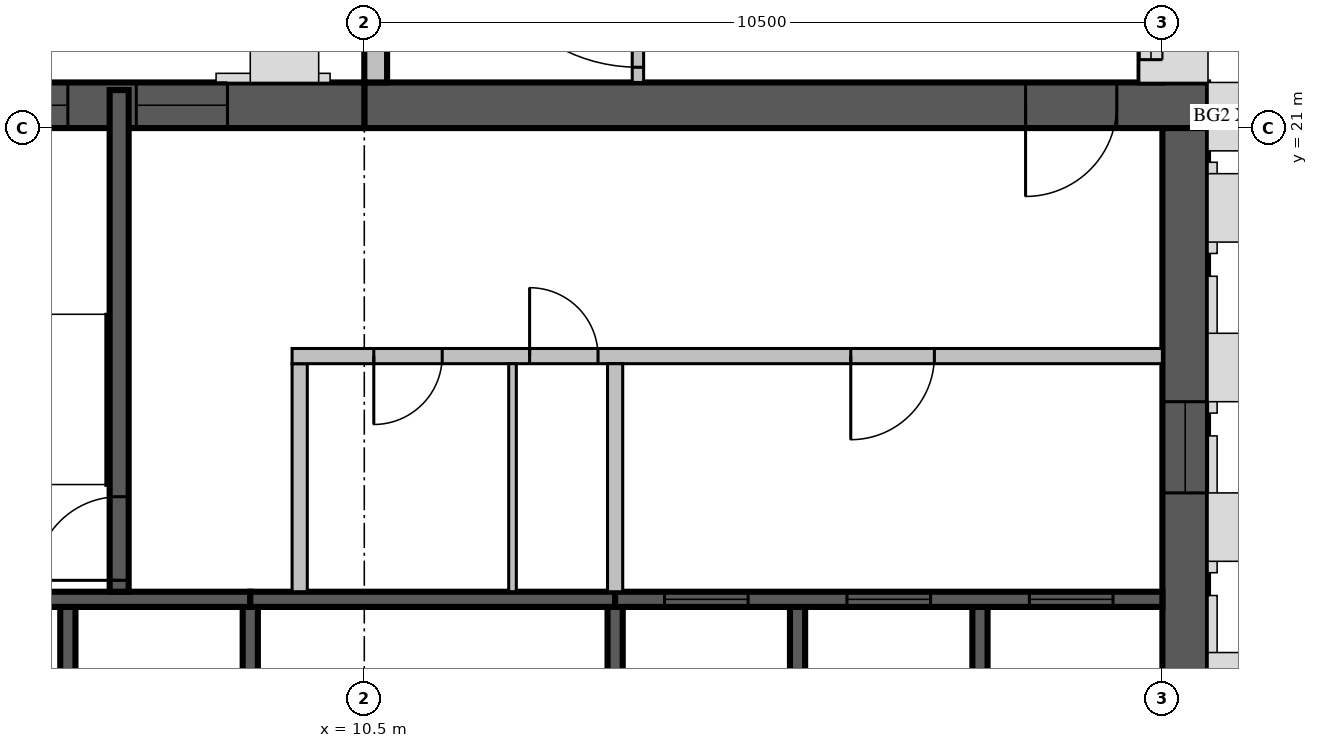
"""IFC4 building model, lengths in metres.
Left out: names, types, materials, properties, quantities, classifications, styles, units other than length and angle.
Written with IfcOpenShell. Run it as: python <this file> out.ifc"""

import sys

from ifc_helpers import new_model, si_unit, direction, frame, frame_2d, origin, place, context, subcontext, project, spatial, rectangle, extrude, source, transform, mapped, element, fill, save


model = new_model("IFC4")
c1 = context("Model", 3, precision=1e-05, world=origin(), true_north=direction((0.0, 1.0)))
c2 = subcontext(c1, "Body", "Model", "MODEL_VIEW")
j1 = project(units=[si_unit("LENGTHUNIT", "METRE"), si_unit("PLANEANGLEUNIT", "RADIAN")], contexts=[c1])
p1 = place(None, origin())
s1 = spatial("IfcSite", under=j1, at=p1, CompositionType="ELEMENT")
p2 = place(p1, origin())
s2 = spatial("IfcBuilding", under=s1, at=p2, CompositionType="ELEMENT")
p3 = place(p2, frame((0.0, 0.0, 326.5)))
s3 = spatial("IfcBuildingStorey", under=s2, at=p3, CompositionType="ELEMENT", Elevation=326.5)
m1 = source(origin(), c2, "Body", "SweptSolid", [
    extrude(rectangle(XDim=11.1, YDim=0.6, at=frame_2d((5.55, 0.0))), origin(), (0.0, 0.0, 1.0), 3.5),
])
p4 = place(p3, frame((10.5, 21.3, 0.0), z_axis=(0.0, 0.0, 1.0), x_axis=(1.0, 0.0, 0.0)))
e1 = element("IfcWall", 1, at=p4, inside=s3, PredefinedType="SHEAR", context=c2, shape_type="MappedRepresentation", body=[
    mapped(m1, transform((0.0, 0.0, 0.0), scale=1.0)),
])
m2 = source(origin(), c2, "Body", "SweptSolid", [
    extrude(rectangle(XDim=1.2, YDim=2.1, at=frame_2d((0.6, 1.05))), frame((0.0, 0.31, 0.0), z_axis=(0.0, -1.0, 0.0), x_axis=(1.0, 0.0, 0.0)), (0.0, 0.0, 1.0), 0.62),
])
p5 = place(p4, frame((8.7, 0.0, 0.0)))
e2 = element("IfcOpeningElement", 2, at=p5, cuts=e1, PredefinedType="OPENING", context=c2, shape_type="MappedRepresentation", body=[
    mapped(m2, transform((0.0, 0.0, 0.0), scale=1.0)),
])
m3 = source(origin(), c2, "Body", "SweptSolid", [
    extrude(rectangle(XDim=10.5, YDim=0.6, at=frame_2d((5.25, 0.0))), origin(), (0.0, 0.0, 1.0), 3.5),
])
p6 = place(p3, frame((21.3, 10.5, 0.0), z_axis=(0.0, 0.0, 1.0), x_axis=(0.0, 1.0, 0.0)))
e3 = element("IfcWall", 3, at=p6, inside=s3, PredefinedType="SHEAR", context=c2, shape_type="MappedRepresentation", body=[
    mapped(m3, transform((0.0, 0.0, 0.0), scale=1.0)),
])
m4 = source(origin(), c2, "Body", "SweptSolid", [
    extrude(rectangle(XDim=1.2, YDim=2.4, at=frame_2d((0.6, 1.2))), frame((0.0, 0.31, 0.0), z_axis=(0.0, -1.0, 0.0), x_axis=(1.0, 0.0, 0.0)), (0.0, 0.0, 1.0), 0.62),
])
p7 = place(p6, frame((5.7, 0.0, 0.6)))
e4 = element("IfcOpeningElement", 4, at=p7, cuts=e3, PredefinedType="OPENING", context=c2, shape_type="MappedRepresentation", body=[
    mapped(m4, transform((0.0, 0.0, 0.0), scale=1.0)),
])
m5 = source(origin(), c2, "Body", "SweptSolid", [
    extrude(rectangle(XDim=6.6, YDim=0.6, at=frame_2d((3.3, 0.0))), origin(), (0.0, 0.0, 1.0), 3.5),
])
p8 = place(p3, frame((3.9, 21.3, 0.0), z_axis=(0.0, 0.0, 1.0), x_axis=(1.0, 0.0, 0.0)))
e5 = element("IfcWall", 5, at=p8, inside=s3, PredefinedType="SHEAR", context=c2, shape_type="MappedRepresentation", body=[
    mapped(m5, transform((0.0, 0.0, 0.0), scale=1.0)),
])
p9 = place(p8, frame((1.5, 0.0, 0.6)))
e6 = element("IfcOpeningElement", 6, at=p9, cuts=e5, PredefinedType="OPENING", context=c2, shape_type="MappedRepresentation", body=[
    mapped(m4, transform((0.0, 0.0, 0.0), scale=1.0)),
])
p10 = place(p8, frame((3.6, 0.0, 0.6)))
e7 = element("IfcOpeningElement", 7, at=p10, cuts=e5, PredefinedType="OPENING", context=c2, shape_type="MappedRepresentation", body=[
    mapped(m4, transform((0.0, 0.0, 0.0), scale=1.0)),
])
m6 = source(origin(), c2, "Body", "SweptSolid", [
    extrude(rectangle(XDim=7.5, YDim=0.3, at=frame_2d((3.75, 0.0))), origin(), (0.0, 0.0, 1.0), 3.1),
])
p11 = place(p3, frame((20.85, 21.6, 0.0), z_axis=(0.0, 0.0, 1.0), x_axis=(0.0, 1.0, 0.0)))
e8 = element("IfcWall", 8, at=p11, inside=s3, PredefinedType="STANDARD", context=c2, shape_type="MappedRepresentation", body=[
    mapped(m6, transform((0.0, 0.0, 0.0), scale=1.0)),
])
m7 = source(origin(), c2, "Body", "SweptSolid", [
    extrude(rectangle(XDim=2.4, YDim=2.0, at=frame_2d((1.2, 1.0))), frame((0.0, 0.16, 0.0), z_axis=(0.0, -1.0, 0.0), x_axis=(1.0, 0.0, 0.0)), (0.0, 0.0, 1.0), 0.32),
])
p12 = place(p11, frame((0.3, 0.0, 0.6)))
e9 = element("IfcOpeningElement", 9, at=p12, cuts=e8, PredefinedType="OPENING", context=c2, shape_type="MappedRepresentation", body=[
    mapped(m7, transform((0.0, 0.0, 0.0), scale=1.0)),
])
m8 = source(origin(), c2, "Body", "SweptSolid", [
    extrude(rectangle(XDim=3.0, YDim=2.0, at=frame_2d((1.5, 1.0))), frame((0.0, 0.16, 0.0), z_axis=(0.0, -1.0, 0.0), x_axis=(1.0, 0.0, 0.0)), (0.0, 0.0, 1.0), 0.32),
])
p13 = place(p11, frame((4.2, 0.0, 0.6)))
e10 = element("IfcOpeningElement", 10, at=p13, cuts=e8, PredefinedType="OPENING", context=c2, shape_type="MappedRepresentation", body=[
    mapped(m8, transform((0.0, 0.0, 0.0), scale=1.0)),
])
p14 = place(p3, frame((10.65, 29.1, 0.0), z_axis=(0.0, 0.0, 1.0), x_axis=(0.0, -1.0, 0.0)))
e11 = element("IfcWall", 11, at=p14, inside=s3, PredefinedType="STANDARD", context=c2, shape_type="MappedRepresentation", body=[
    mapped(m6, transform((0.0, 0.0, 0.0), scale=1.0)),
])
m9 = source(origin(), c2, "Body", "SweptSolid", [
    extrude(rectangle(XDim=3.6, YDim=2.0, at=frame_2d((1.8, 1.0))), frame((0.0, 0.16, 0.0), z_axis=(0.0, -1.0, 0.0), x_axis=(1.0, 0.0, 0.0)), (0.0, 0.0, 1.0), 0.32),
])
p15 = place(p14, frame((3.36, 0.0, 0.6)))
e12 = element("IfcOpeningElement", 12, at=p15, cuts=e11, PredefinedType="OPENING", context=c2, shape_type="MappedRepresentation", body=[
    mapped(m9, transform((0.0, 0.0, 0.0), scale=1.0)),
])
p16 = place(p14, frame((0.48, 0.0, 0.6)))
e13 = element("IfcOpeningElement", 13, at=p16, cuts=e11, PredefinedType="OPENING", context=c2, shape_type="MappedRepresentation", body=[
    mapped(m7, transform((0.0, 0.0, 0.0), scale=1.0)),
])
m10 = source(origin(), c2, "Body", "SweptSolid", [
    extrude(rectangle(XDim=3.0, YDim=0.2, at=frame_2d((1.5, 0.0))), origin(), (0.0, 0.0, 1.0), 3.5),
])
p17 = place(p3, frame((6.6, 11.7, 0.0), z_axis=(0.0, 0.0, 1.0), x_axis=(0.0, 1.0, 0.0)))
e14 = element("IfcWall", 14, at=p17, inside=s3, PredefinedType="SOLIDWALL", context=c2, shape_type="MappedRepresentation", body=[
    mapped(m10, transform((0.0, 0.0, 0.0), scale=1.0)),
])
m11 = source(origin(), c2, "Body", "SweptSolid", [
    extrude(rectangle(XDim=3.0, YDim=0.2, at=frame_2d((1.5, 0.0))), origin(), (0.0, 0.0, 1.0), 3.1),
])
for number, where, z_axis, x_axis in (
    (15, (9.0, 11.7, 0.0), (0.0, 0.0, 1.0), (0.0, 1.0, 0.0)),
    (16, (13.8, 11.7, 0.0), (0.0, 0.0, 1.0), (0.0, 1.0, 0.0)),
):
    element("IfcWall", number, at=place(p3, frame(where, z_axis=z_axis, x_axis=x_axis)), inside=s3, PredefinedType="SOLIDWALL", context=c2, shape_type="MappedRepresentation", body=[
        mapped(m11, transform((0.0, 0.0, 0.0), scale=1.0)),
    ])
for number, where, z_axis, x_axis in (
    (17, (16.2, 11.7, 0.0), (0.0, 0.0, 1.0), (0.0, 1.0, 0.0)),
    (18, (18.6, 11.7, 0.0), (0.0, 0.0, 1.0), (0.0, 1.0, 0.0)),
):
    element("IfcWall", number, at=place(p3, frame(where, z_axis=z_axis, x_axis=x_axis)), inside=s3, PredefinedType="SOLIDWALL", context=c2, shape_type="MappedRepresentation", body=[
        mapped(m10, transform((0.0, 0.0, 0.0), scale=1.0)),
    ])
m12 = source(origin(), c2, "Body", "SweptSolid", [
    extrude(rectangle(XDim=4.8, YDim=0.2, at=frame_2d((2.4, 0.0))), origin(), (0.0, 0.0, 1.0), 3.5),
])
p18 = place(p3, frame((4.2, 14.8, 0.0), z_axis=(0.0, 0.0, 1.0), x_axis=(1.0, 0.0, 0.0)))
e19 = element("IfcWall", 19, at=p18, inside=s3, PredefinedType="SOLIDWALL", context=c2, shape_type="MappedRepresentation", body=[
    mapped(m12, transform((0.0, 0.0, 0.0), scale=1.0)),
])
m13 = source(origin(), c2, "Body", "SweptSolid", [
    extrude(rectangle(XDim=4.8, YDim=0.2, at=frame_2d((2.4, 0.0))), origin(), (0.0, 0.0, 1.0), 3.1),
])
p19 = place(p3, frame((9.0, 14.8, 0.0), z_axis=(0.0, 0.0, 1.0), x_axis=(1.0, 0.0, 0.0)))
e20 = element("IfcWall", 20, at=p19, inside=s3, PredefinedType="SOLIDWALL", context=c2, shape_type="MappedRepresentation", body=[
    mapped(m13, transform((0.0, 0.0, 0.0), scale=1.0)),
])
m14 = source(origin(), c2, "Body", "SweptSolid", [
    extrude(rectangle(XDim=7.2, YDim=0.2, at=frame_2d((3.6, 0.0))), origin(), (0.0, 0.0, 1.0), 3.5),
])
p20 = place(p3, frame((13.8, 14.8, 0.0), z_axis=(0.0, 0.0, 1.0), x_axis=(1.0, 0.0, 0.0)))
e21 = element("IfcWall", 21, at=p20, inside=s3, PredefinedType="SOLIDWALL", context=c2, shape_type="MappedRepresentation", body=[
    mapped(m14, transform((0.0, 0.0, 0.0), scale=1.0)),
])
m15 = source(origin(), c2, "Body", "SweptSolid", [
    extrude(rectangle(XDim=1.1, YDim=2.1, at=frame_2d((0.55, 1.05))), frame((0.0, 0.11, 0.0), z_axis=(0.0, -1.0, 0.0), x_axis=(1.0, 0.0, 0.0)), (0.0, 0.0, 1.0), 0.22),
])
p21 = place(p20, frame((0.65, 0.0, 0.0)))
e22 = element("IfcOpeningElement", 22, at=p21, cuts=e21, PredefinedType="OPENING", context=c2, shape_type="MappedRepresentation", body=[
    mapped(m15, transform((0.0, 0.0, 0.0), scale=1.0)),
])
p22 = place(p20, frame((3.05, 0.0, 0.0)))
e23 = element("IfcOpeningElement", 23, at=p22, cuts=e21, PredefinedType="OPENING", context=c2, shape_type="MappedRepresentation", body=[
    mapped(m15, transform((0.0, 0.0, 0.0), scale=1.0)),
])
p23 = place(p20, frame((5.45, 0.0, 0.0)))
e24 = element("IfcOpeningElement", 24, at=p23, cuts=e21, PredefinedType="OPENING", context=c2, shape_type="MappedRepresentation", body=[
    mapped(m15, transform((0.0, 0.0, 0.0), scale=1.0)),
])
m16 = source(origin(), c2, "Body", "SweptSolid", [
    extrude(rectangle(XDim=6.6, YDim=0.25, at=frame_2d((3.3, 0.0))), origin(), (0.0, 0.0, 1.0), 3.1),
])
p24 = place(p3, frame((7.275, 14.9, 0.0), z_axis=(0.0, 0.0, 1.0), x_axis=(0.0, 1.0, 0.0)))
e25 = element("IfcWall", 25, at=p24, inside=s3, PredefinedType="SOLIDWALL", context=c2, shape_type="MappedRepresentation", body=[
    mapped(m16, transform((0.0, 0.0, 0.0), scale=1.0)),
])
m17 = source(origin(), c2, "Body", "SweptSolid", [
    extrude(rectangle(XDim=1.1, YDim=2.1, at=frame_2d((0.55, 1.05))), frame((0.0, 0.135, 0.0), z_axis=(0.0, -1.0, 0.0), x_axis=(1.0, 0.0, 0.0)), (0.0, 0.0, 1.0), 0.27),
])
p25 = place(p24, frame((0.15, 0.0, 0.0)))
e26 = element("IfcOpeningElement", 26, at=p25, cuts=e25, PredefinedType="OPENING", context=c2, shape_type="MappedRepresentation", body=[
    mapped(m17, transform((0.0, 0.0, 0.0), scale=1.0)),
])
m18 = source(origin(), c2, "Body", "SweptSolid", [
    extrude(rectangle(XDim=3.0, YDim=0.2, at=frame_2d((1.5, 0.0))), origin(), (0.0, 0.0, 1.0), 3.1),
])
p26 = place(p3, frame((9.65, 14.9, 0.0), z_axis=(0.0, 0.0, 1.0), x_axis=(0.0, 1.0, 0.0)))
e27 = element("IfcWall", 27, at=p26, inside=s3, PredefinedType="PARTITIONING", context=c2, shape_type="MappedRepresentation", body=[
    mapped(m18, transform((0.0, 0.0, 0.0), scale=1.0)),
])
m19 = source(origin(), c2, "Body", "SweptSolid", [
    extrude(rectangle(XDim=11.45, YDim=0.2, at=frame_2d((5.725, 0.0))), origin(), (0.0, 0.0, 1.0), 3.1),
])
p27 = place(p3, frame((9.55, 18.0, 0.0), z_axis=(0.0, 0.0, 1.0), x_axis=(1.0, 0.0, 0.0)))
e28 = element("IfcWall", 28, at=p27, inside=s3, PredefinedType="PARTITIONING", context=c2, shape_type="MappedRepresentation", body=[
    mapped(m19, transform((0.0, 0.0, 0.0), scale=1.0)),
])
m20 = source(origin(), c2, "Body", "SweptSolid", [
    extrude(rectangle(XDim=0.9, YDim=2.1, at=frame_2d((0.45, 1.05))), frame((0.0, 0.11, 0.0), z_axis=(0.0, -1.0, 0.0), x_axis=(1.0, 0.0, 0.0)), (0.0, 0.0, 1.0), 0.22),
])
p28 = place(p27, frame((1.075, 0.0, 0.0)))
e29 = element("IfcOpeningElement", 29, at=p28, cuts=e28, PredefinedType="OPENING", context=c2, shape_type="MappedRepresentation", body=[
    mapped(m20, transform((0.0, 0.0, 0.0), scale=1.0)),
])
p29 = place(p27, frame((3.125, 0.0, 0.0)))
e30 = element("IfcOpeningElement", 30, at=p29, cuts=e28, PredefinedType="OPENING", context=c2, shape_type="MappedRepresentation", body=[
    mapped(m20, transform((0.0, 0.0, 0.0), scale=1.0)),
])
p30 = place(p27, frame((7.35, 0.0, 0.0)))
e31 = element("IfcOpeningElement", 31, at=p30, cuts=e28, PredefinedType="OPENING", context=c2, shape_type="MappedRepresentation", body=[
    mapped(m15, transform((0.0, 0.0, 0.0), scale=1.0)),
])
p31 = place(p3, frame((13.8, 14.9, 0.0), z_axis=(0.0, 0.0, 1.0), x_axis=(0.0, 1.0, 0.0)))
e32 = element("IfcWall", 32, at=p31, inside=s3, PredefinedType="PARTITIONING", context=c2, shape_type="MappedRepresentation", body=[
    mapped(m18, transform((0.0, 0.0, 0.0), scale=1.0)),
])
m21 = source(origin(), c2, "Body", "SweptSolid", [
    extrude(rectangle(XDim=3.0, YDim=0.1, at=frame_2d((1.5, 0.0))), origin(), (0.0, 0.0, 1.0), 3.1),
])
p32 = place(p3, frame((12.45, 14.9, 0.0), z_axis=(0.0, 0.0, 1.0), x_axis=(0.0, 1.0, 0.0)))
e33 = element("IfcWall", 33, at=p32, inside=s3, PredefinedType="PARTITIONING", context=c2, shape_type="MappedRepresentation", body=[
    mapped(m21, transform((0.0, 0.0, 0.0), scale=1.0)),
])
m22 = source(origin(), c2, "Body", "SweptSolid", [
    extrude(rectangle(XDim=7.725, YDim=0.15, at=frame_2d((3.862, 0.0))), origin(), (0.0, 0.0, 1.0), 3.1),
])
p33 = place(p3, frame((14.1, 29.325, 0.0), z_axis=(0.0, 0.0, 1.0), x_axis=(0.0, -1.0, 0.0)))
e34 = element("IfcWall", 34, at=p33, inside=s3, PredefinedType="PARTITIONING", context=c2, shape_type="MappedRepresentation", body=[
    mapped(m22, transform((0.0, 0.0, 0.0), scale=1.0)),
])
m23 = source(origin(), c2, "Body", "SweptSolid", [
    extrude(rectangle(XDim=2.2, YDim=2.1, at=frame_2d((1.1, 1.05))), frame((0.0, 0.085, 0.0), z_axis=(0.0, -1.0, 0.0), x_axis=(1.0, 0.0, 0.0)), (0.0, 0.0, 1.0), 0.17),
])
p34 = place(p33, frame((5.325, 0.0, 0.0)))
e35 = element("IfcOpeningElement", 35, at=p34, cuts=e34, PredefinedType="OPENING", context=c2, shape_type="MappedRepresentation", body=[
    mapped(m23, transform((0.0, 0.0, 0.0), scale=1.0)),
])
m24 = source(origin(), c2, "Body", "SweptSolid", [
    extrude(rectangle(XDim=2.4, YDim=2.0, at=frame_2d((1.2, 1.0))), frame((0.0, 0.03, 0.0), z_axis=(0.0, -1.0, 0.0), x_axis=(1.0, 0.0, 0.0)), (0.0, 0.0, 1.0), 0.06),
])
p35 = place(p12, origin())
e36 = element("IfcWindow", 36, at=p35, inside=s3, PartitioningType="SINGLE_PANEL", PredefinedType="WINDOW", context=c2, shape_type="MappedRepresentation", body=[
    mapped(m24, transform((0.0, 0.0, 0.0), scale=1.0)),
])
fill(e9, e36)
m25 = source(origin(), c2, "Body", "SweptSolid", [
    extrude(rectangle(XDim=1.1, YDim=2.1, at=frame_2d((0.55, 1.05))), frame((0.0, 0.025, 0.0), z_axis=(0.0, -1.0, 0.0), x_axis=(1.0, 0.0, 0.0)), (0.0, 0.0, 1.0), 0.05),
])
p36 = place(p21, origin())
e37 = element("IfcDoor", 37, at=p36, inside=s3, OperationType="SLIDING_TO_LEFT", PredefinedType="DOOR", context=c2, shape_type="MappedRepresentation", body=[
    mapped(m25, transform((0.0, 0.0, 0.0), scale=1.0)),
])
fill(e22, e37)
p37 = place(p22, origin())
e38 = element("IfcDoor", 38, at=p37, inside=s3, OperationType="SLIDING_TO_LEFT", PredefinedType="DOOR", context=c2, shape_type="MappedRepresentation", body=[
    mapped(m25, transform((0.0, 0.0, 0.0), scale=1.0)),
])
fill(e23, e38)
p38 = place(p23, origin())
e39 = element("IfcDoor", 39, at=p38, inside=s3, OperationType="SLIDING_TO_LEFT", PredefinedType="DOOR", context=c2, shape_type="MappedRepresentation", body=[
    mapped(m25, transform((0.0, 0.0, 0.0), scale=1.0)),
])
fill(e24, e39)
p39 = place(p25, origin())
e40 = element("IfcDoor", 40, at=p39, inside=s3, OperationType="SINGLE_SWING_LEFT", PredefinedType="DOOR", context=c2, shape_type="MappedRepresentation", body=[
    mapped(m25, transform((0.0, 0.0, 0.0), scale=1.0)),
])
fill(e26, e40)
m26 = source(origin(), c2, "Body", "SweptSolid", [
    extrude(rectangle(XDim=0.9, YDim=2.1, at=frame_2d((0.45, 1.05))), frame((0.0, 0.025, 0.0), z_axis=(0.0, -1.0, 0.0), x_axis=(1.0, 0.0, 0.0)), (0.0, 0.0, 1.0), 0.05),
])
p40 = place(p28, origin())
e41 = element("IfcDoor", 41, at=p40, inside=s3, OperationType="SINGLE_SWING_RIGHT", PredefinedType="DOOR", context=c2, shape_type="MappedRepresentation", body=[
    mapped(m26, transform((0.0, 0.0, 0.0), scale=1.0)),
])
fill(e29, e41)
p41 = place(p29, origin())
e42 = element("IfcDoor", 42, at=p41, inside=s3, OperationType="SINGLE_SWING_LEFT", PredefinedType="DOOR", context=c2, shape_type="MappedRepresentation", body=[
    mapped(m26, transform((0.0, 0.0, 0.0), scale=1.0)),
])
fill(e30, e42)
p42 = place(p30, origin())
e43 = element("IfcDoor", 43, at=p42, inside=s3, OperationType="SINGLE_SWING_RIGHT", PredefinedType="DOOR", context=c2, shape_type="MappedRepresentation", body=[
    mapped(m25, transform((0.0, 0.0, 0.0), scale=1.0)),
])
fill(e31, e43)
m27 = source(origin(), c2, "Body", "SweptSolid", [
    extrude(rectangle(XDim=1.2, YDim=2.1, at=frame_2d((0.6, 1.05))), frame((0.0, 0.025, 0.0), z_axis=(0.0, -1.0, 0.0), x_axis=(1.0, 0.0, 0.0)), (0.0, 0.0, 1.0), 0.05),
])
p43 = place(p5, origin())
e44 = element("IfcDoor", 44, at=p43, inside=s3, OperationType="SINGLE_SWING_RIGHT", PredefinedType="DOOR", context=c2, shape_type="MappedRepresentation", body=[
    mapped(m27, transform((0.0, 0.0, 0.0), scale=1.0)),
])
fill(e2, e44)
m28 = source(origin(), c2, "Body", "SweptSolid", [
    extrude(rectangle(XDim=1.2, YDim=2.4, at=frame_2d((0.6, 1.2))), frame((0.0, 0.03, 0.0), z_axis=(0.0, -1.0, 0.0), x_axis=(1.0, 0.0, 0.0)), (0.0, 0.0, 1.0), 0.06),
])
p44 = place(p7, origin())
e45 = element("IfcWindow", 45, at=p44, inside=s3, PartitioningType="SINGLE_PANEL", PredefinedType="WINDOW", context=c2, shape_type="MappedRepresentation", body=[
    mapped(m28, transform((0.0, 0.0, 0.0), scale=1.0)),
])
fill(e4, e45)
p45 = place(p9, origin())
e46 = element("IfcWindow", 46, at=p45, inside=s3, PartitioningType="SINGLE_PANEL", PredefinedType="WINDOW", context=c2, shape_type="MappedRepresentation", body=[
    mapped(m28, transform((0.0, 0.0, 0.0), scale=1.0)),
])
fill(e6, e46)
p46 = place(p10, origin())
e47 = element("IfcWindow", 47, at=p46, inside=s3, PartitioningType="SINGLE_PANEL", PredefinedType="WINDOW", context=c2, shape_type="MappedRepresentation", body=[
    mapped(m28, transform((0.0, 0.0, 0.0), scale=1.0)),
])
fill(e7, e47)
m29 = source(origin(), c2, "Body", "SweptSolid", [
    extrude(rectangle(XDim=2.2, YDim=2.1, at=frame_2d((1.1, 1.05))), frame((0.0, 0.025, 0.0), z_axis=(0.0, -1.0, 0.0), x_axis=(1.0, 0.0, 0.0)), (0.0, 0.0, 1.0), 0.05),
])
p47 = place(p34, origin())
e48 = element("IfcDoor", 48, at=p47, inside=s3, OperationType="DOUBLE_DOOR_SINGLE_SWING", PredefinedType="DOOR", context=c2, shape_type="MappedRepresentation", body=[
    mapped(m29, transform((0.0, 0.0, 0.0), scale=1.0)),
])
fill(e35, e48)
save(model, sys.argv[1])
